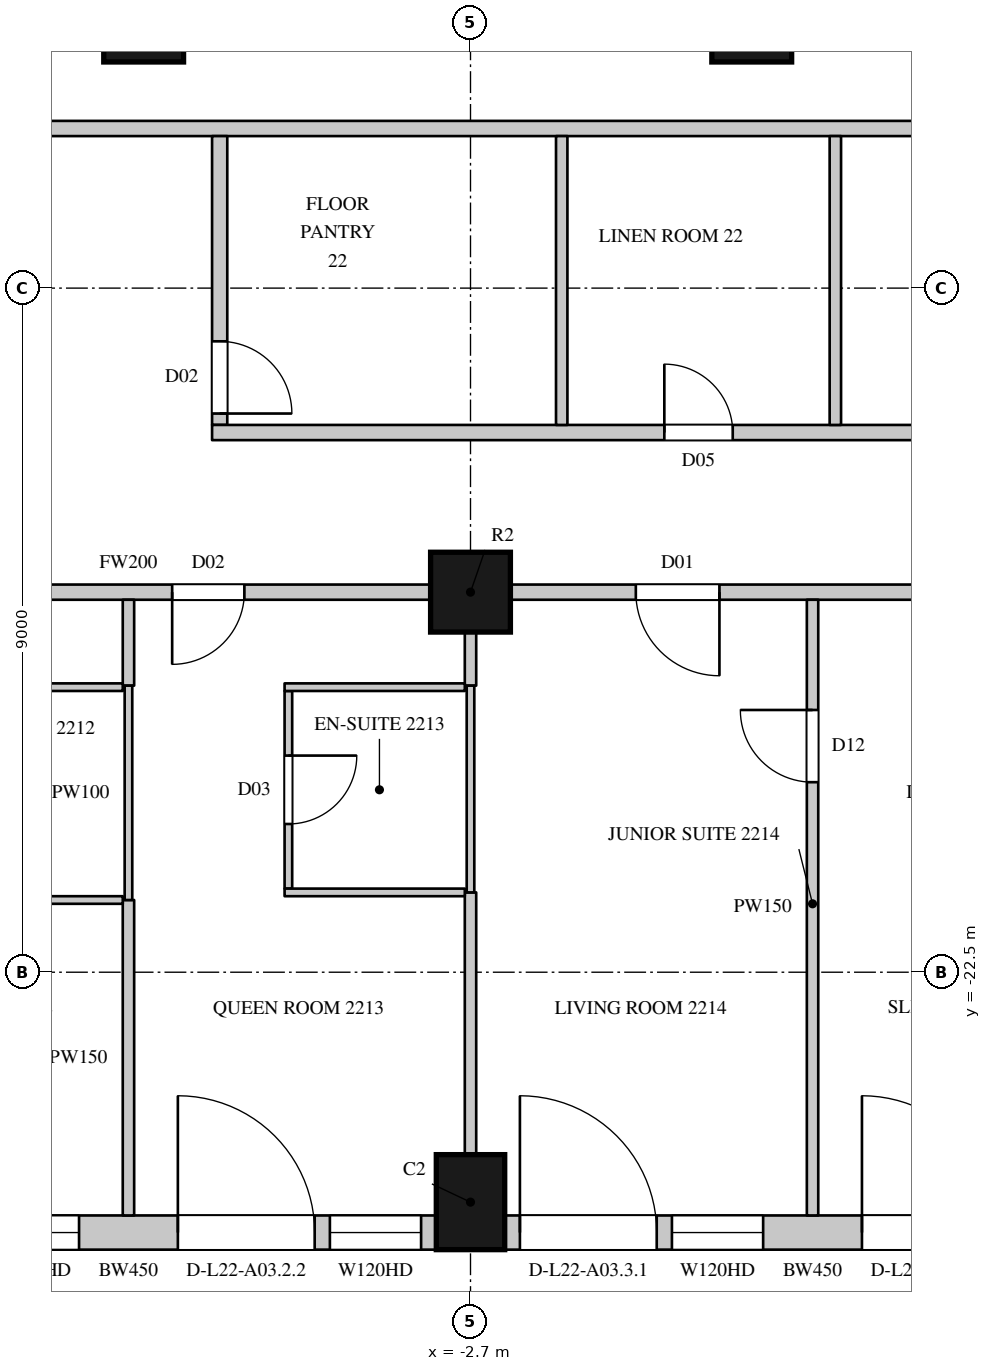
"""IFC4 building model, lengths in metres.
Left out: names, types, materials, properties, quantities, classifications, styles, units other than length and angle.
Written with IfcOpenShell. Run it as: python <this file> out.ifc"""

import sys

from ifc_helpers import new_model, si_unit, direction, frame, frame_2d, origin, origin_2d, place, context, subcontext, project, spatial, rectangle, circle, extrude, element, fill, save


model = new_model("IFC4")
c1 = context("Model", 3, precision=1e-05, world=origin(), true_north=direction((0.0, 1.0)))
c2 = subcontext(c1, "Body", "Model", "MODEL_VIEW")
j1 = project(units=[si_unit("LENGTHUNIT", "METRE"), si_unit("PLANEANGLEUNIT", "RADIAN")], contexts=[c1])
p1 = place(None, origin())
s1 = spatial("IfcSite", under=j1, at=p1, CompositionType="ELEMENT")
p2 = place(p1, origin())
s2 = spatial("IfcBuilding", under=s1, at=p2, CompositionType="ELEMENT")
p3 = place(p2, frame((0.0, 0.0, 109.5)))
s3 = spatial("IfcBuildingStorey", under=s2, at=p3, CompositionType="ELEMENT", Elevation=109.5)
p4 = place(p3, frame((-2.7, -25.525, 0.0), z_axis=(0.0, 0.0, 1.0), x_axis=(1.0, 0.0, 0.0)))
e1 = element("IfcColumn", 1, at=p4, inside=s3, PredefinedType="COLUMN", context=c2, shape_type="SweptSolid", body=[
    extrude(rectangle(XDim=0.9, YDim=1.25, at=origin_2d()), origin(), (0.0, 0.0, 1.0), 3.6),
])
for number, where, z_axis, x_axis in (
    (2, (-2.7, -17.5, 0.0), (0.0, 0.0, 1.0), (1.0, 0.0, 0.0)),
    (3, (-7.0, -10.0, 0.0), (0.0, 0.0, 1.0), (1.0, 0.0, 0.0)),
    (4, (1.0, -10.0, 0.0), (0.0, 0.0, 1.0), (1.0, 0.0, 0.0)),
):
    element("IfcColumn", number, at=place(p3, frame(where, z_axis=z_axis, x_axis=x_axis)), inside=s3, PredefinedType="COLUMN", context=c2, shape_type="SweptSolid", body=[
        extrude(circle(Radius=0.525, at=origin_2d()), origin(), (0.0, 0.0, 1.0), 3.6),
    ])
p5 = place(p3, frame((-11.25, -25.925, 0.0), z_axis=(0.0, 0.0, 1.0), x_axis=(1.0, 0.0, 0.0)))
e5 = element("IfcWall", 5, at=p5, inside=s3, PredefinedType="SOLIDWALL", context=c2, shape_type="SweptSolid", body=[
    extrude(rectangle(XDim=8.1, YDim=0.45, at=frame_2d((4.05, 0.0))), origin(), (0.0, 0.0, 1.0), 3.3),
])
p6 = place(p5, frame((0.2, 0.0, 0.0)))
e6 = element("IfcOpeningElement", 6, at=p6, cuts=e5, PredefinedType="OPENING", context=c2, shape_type="SweptSolid", body=[
    extrude(rectangle(XDim=1.8, YDim=2.4, at=frame_2d((0.9, 1.2))), frame((0.0, 0.235, 0.0), z_axis=(0.0, -1.0, 0.0), x_axis=(1.0, 0.0, 0.0)), (0.0, 0.0, 1.0), 0.47),
])
p7 = place(p5, frame((2.2, 0.0, 1.05)))
e7 = element("IfcOpeningElement", 7, at=p7, cuts=e5, PredefinedType="OPENING", context=c2, shape_type="SweptSolid", body=[
    extrude(rectangle(XDim=1.2, YDim=2.0, at=frame_2d((0.6, 1.0))), frame((0.0, 0.235, 0.0), z_axis=(0.0, -1.0, 0.0), x_axis=(1.0, 0.0, 0.0)), (0.0, 0.0, 1.0), 0.47),
])
p8 = place(p5, frame((4.7, 0.0, 0.0)))
e8 = element("IfcOpeningElement", 8, at=p8, cuts=e5, PredefinedType="OPENING", context=c2, shape_type="SweptSolid", body=[
    extrude(rectangle(XDim=1.8, YDim=2.4, at=frame_2d((0.9, 1.2))), frame((0.0, 0.235, 0.0), z_axis=(0.0, -1.0, 0.0), x_axis=(1.0, 0.0, 0.0)), (0.0, 0.0, 1.0), 0.47),
])
p9 = place(p5, frame((6.7, 0.0, 1.05)))
e9 = element("IfcOpeningElement", 9, at=p9, cuts=e5, PredefinedType="OPENING", context=c2, shape_type="SweptSolid", body=[
    extrude(rectangle(XDim=1.2, YDim=2.0, at=frame_2d((0.6, 1.0))), frame((0.0, 0.235, 0.0), z_axis=(0.0, -1.0, 0.0), x_axis=(1.0, 0.0, 0.0)), (0.0, 0.0, 1.0), 0.47),
])
p10 = place(p3, frame((-2.25, -25.925, 0.0), z_axis=(0.0, 0.0, 1.0), x_axis=(1.0, 0.0, 0.0)))
e10 = element("IfcWall", 10, at=p10, inside=s3, PredefinedType="SOLIDWALL", context=c2, shape_type="SweptSolid", body=[
    extrude(rectangle(XDim=8.1, YDim=0.45, at=frame_2d((4.05, 0.0))), origin(), (0.0, 0.0, 1.0), 3.3),
])
p11 = place(p10, frame((0.2, 0.0, 0.0)))
e11 = element("IfcOpeningElement", 11, at=p11, cuts=e10, PredefinedType="OPENING", context=c2, shape_type="SweptSolid", body=[
    extrude(rectangle(XDim=1.8, YDim=2.4, at=frame_2d((0.9, 1.2))), frame((0.0, 0.235, 0.0), z_axis=(0.0, -1.0, 0.0), x_axis=(1.0, 0.0, 0.0)), (0.0, 0.0, 1.0), 0.47),
])
p12 = place(p10, frame((2.2, 0.0, 1.05)))
e12 = element("IfcOpeningElement", 12, at=p12, cuts=e10, PredefinedType="OPENING", context=c2, shape_type="SweptSolid", body=[
    extrude(rectangle(XDim=1.2, YDim=2.0, at=frame_2d((0.6, 1.0))), frame((0.0, 0.235, 0.0), z_axis=(0.0, -1.0, 0.0), x_axis=(1.0, 0.0, 0.0)), (0.0, 0.0, 1.0), 0.47),
])
p13 = place(p10, frame((4.7, 0.0, 0.0)))
e13 = element("IfcOpeningElement", 13, at=p13, cuts=e10, PredefinedType="OPENING", context=c2, shape_type="SweptSolid", body=[
    extrude(rectangle(XDim=1.8, YDim=2.4, at=frame_2d((0.9, 1.2))), frame((0.0, 0.235, 0.0), z_axis=(0.0, -1.0, 0.0), x_axis=(1.0, 0.0, 0.0)), (0.0, 0.0, 1.0), 0.47),
])
p14 = place(p10, frame((6.7, 0.0, 1.05)))
e14 = element("IfcOpeningElement", 14, at=p14, cuts=e10, PredefinedType="OPENING", context=c2, shape_type="SweptSolid", body=[
    extrude(rectangle(XDim=1.2, YDim=2.0, at=frame_2d((0.6, 1.0))), frame((0.0, 0.235, 0.0), z_axis=(0.0, -1.0, 0.0), x_axis=(1.0, 0.0, 0.0)), (0.0, 0.0, 1.0), 0.47),
])
p15 = place(p3, frame((-11.175, -17.5, 0.0), z_axis=(0.0, 0.0, 1.0), x_axis=(1.0, 0.0, 0.0)))
e15 = element("IfcWall", 15, at=p15, inside=s3, PredefinedType="PARTITIONING", context=c2, shape_type="SweptSolid", body=[
    extrude(rectangle(XDim=7.95, YDim=0.2, at=frame_2d((3.975, 0.0))), origin(), (0.0, 0.0, 1.0), 2.75),
])
p16 = place(p15, frame((4.55, 0.0, 0.0)))
e16 = element("IfcOpeningElement", 16, at=p16, cuts=e15, PredefinedType="OPENING", context=c2, shape_type="SweptSolid", body=[
    extrude(rectangle(XDim=0.95, YDim=2.2, at=frame_2d((0.475, 1.1))), frame((0.0, 0.11, 0.0), z_axis=(0.0, -1.0, 0.0), x_axis=(1.0, 0.0, 0.0)), (0.0, 0.0, 1.0), 0.22),
])
p17 = place(p3, frame((-2.175, -17.5, 0.0), z_axis=(0.0, 0.0, 1.0), x_axis=(1.0, 0.0, 0.0)))
e17 = element("IfcWall", 17, at=p17, inside=s3, PredefinedType="PARTITIONING", context=c2, shape_type="SweptSolid", body=[
    extrude(rectangle(XDim=7.95, YDim=0.2, at=frame_2d((3.975, 0.0))), origin(), (0.0, 0.0, 1.0), 2.75),
])
p18 = place(p17, frame((1.65, 0.0, 0.0)))
e18 = element("IfcOpeningElement", 18, at=p18, cuts=e17, PredefinedType="OPENING", context=c2, shape_type="SweptSolid", body=[
    extrude(rectangle(XDim=1.1, YDim=2.4, at=frame_2d((0.55, 1.2))), frame((0.0, 0.11, 0.0), z_axis=(0.0, -1.0, 0.0), x_axis=(1.0, 0.0, 0.0)), (0.0, 0.0, 1.0), 0.22),
])
p19 = place(p3, frame((-8.5, -11.4, 0.0), z_axis=(0.0, 0.0, 1.0), x_axis=(1.0, 0.0, 0.0)))
e19 = element("IfcWall", 19, at=p19, inside=s3, PredefinedType="PARTITIONING", context=c2, shape_type="SweptSolid", body=[
    extrude(rectangle(XDim=18.9, YDim=0.2, at=frame_2d((9.45, 0.0))), origin(), (0.0, 0.0, 1.0), 3.3),
])
p20 = place(p3, frame((-6.0, -15.3, 0.0), z_axis=(0.0, 0.0, 1.0), x_axis=(0.0, 1.0, 0.0)))
e20 = element("IfcWall", 20, at=p20, inside=s3, PredefinedType="PARTITIONING", context=c2, shape_type="SweptSolid", body=[
    extrude(rectangle(XDim=3.8, YDim=0.2, at=frame_2d((1.9, 0.0))), origin(), (0.0, 0.0, 1.0), 3.3),
])
p21 = place(p20, frame((0.15, 0.0, 0.0)))
e21 = element("IfcOpeningElement", 21, at=p21, cuts=e20, PredefinedType="OPENING", context=c2, shape_type="SweptSolid", body=[
    extrude(rectangle(XDim=0.95, YDim=2.2, at=frame_2d((0.475, 1.1))), frame((0.0, 0.11, 0.0), z_axis=(0.0, -1.0, 0.0), x_axis=(1.0, 0.0, 0.0)), (0.0, 0.0, 1.0), 0.22),
])
p22 = place(p3, frame((-6.1, -15.4, 0.0), z_axis=(0.0, 0.0, 1.0), x_axis=(1.0, 0.0, 0.0)))
e22 = element("IfcWall", 22, at=p22, inside=s3, PredefinedType="PARTITIONING", context=c2, shape_type="SweptSolid", body=[
    extrude(rectangle(XDim=20.2, YDim=0.2, at=frame_2d((10.1, 0.0))), origin(), (0.0, 0.0, 1.0), 3.3),
])
p23 = place(p22, frame((5.95, 0.0, 0.0)))
e23 = element("IfcOpeningElement", 23, at=p23, cuts=e22, PredefinedType="OPENING", context=c2, shape_type="SweptSolid", body=[
    extrude(rectangle(XDim=0.9, YDim=2.2, at=frame_2d((0.45, 1.1))), frame((0.0, 0.11, 0.0), z_axis=(0.0, -1.0, 0.0), x_axis=(1.0, 0.0, 0.0)), (0.0, 0.0, 1.0), 0.22),
])
p24 = place(p22, frame((16.1, 0.0, 0.0)))
e24 = element("IfcOpeningElement", 24, at=p24, cuts=e22, PredefinedType="OPENING", context=c2, shape_type="SweptSolid", body=[
    extrude(rectangle(XDim=0.9, YDim=2.2, at=frame_2d((0.45, 1.1))), frame((0.0, 0.11, 0.0), z_axis=(0.0, -1.0, 0.0), x_axis=(1.0, 0.0, 0.0)), (0.0, 0.0, 1.0), 0.22),
])
p25 = place(p3, frame((-7.2, -25.7, 0.0), z_axis=(0.0, 0.0, 1.0), x_axis=(0.0, 1.0, 0.0)))
e25 = element("IfcWall", 25, at=p25, inside=s3, PredefinedType="PARTITIONING", context=c2, shape_type="SweptSolid", body=[
    extrude(rectangle(XDim=4.15, YDim=0.15, at=frame_2d((2.075, 0.0))), origin(), (0.0, 0.0, 1.0), 2.65),
])
p26 = place(p3, frame((-7.2, -18.73, 0.0), z_axis=(0.0, 0.0, 1.0), x_axis=(0.0, 1.0, 0.0)))
e26 = element("IfcWall", 26, at=p26, inside=s3, PredefinedType="PARTITIONING", context=c2, shape_type="SweptSolid", body=[
    extrude(rectangle(XDim=1.13, YDim=0.15, at=frame_2d((0.565, 0.0))), origin(), (0.0, 0.0, 1.0), 2.65),
])
p27 = place(p3, frame((-2.7, -24.9, 0.0), z_axis=(0.0, 0.0, 1.0), x_axis=(0.0, 1.0, 0.0)))
e27 = element("IfcWall", 27, at=p27, inside=s3, PredefinedType="PARTITIONING", context=c2, shape_type="SweptSolid", body=[
    extrude(rectangle(XDim=3.45, YDim=0.15, at=frame_2d((1.725, 0.0))), origin(), (0.0, 0.0, 1.0), 2.75),
])
p28 = place(p3, frame((-2.7, -18.73, 0.0), z_axis=(0.0, 0.0, 1.0), x_axis=(0.0, 1.0, 0.0)))
e28 = element("IfcWall", 28, at=p28, inside=s3, PredefinedType="PARTITIONING", context=c2, shape_type="SweptSolid", body=[
    extrude(rectangle(XDim=0.705, YDim=0.15, at=frame_2d((0.353, 0.0))), origin(), (0.0, 0.0, 1.0), 2.75),
])
p29 = place(p3, frame((-1.5, -15.3, 0.0), z_axis=(0.0, 0.0, 1.0), x_axis=(0.0, 1.0, 0.0)))
e29 = element("IfcWall", 29, at=p29, inside=s3, PredefinedType="PARTITIONING", context=c2, shape_type="SweptSolid", body=[
    extrude(rectangle(XDim=3.8, YDim=0.15, at=frame_2d((1.9, 0.0))), origin(), (0.0, 0.0, 1.0), 3.3),
])
p30 = place(p3, frame((1.8, -25.7, 0.0), z_axis=(0.0, 0.0, 1.0), x_axis=(0.0, 1.0, 0.0)))
e30 = element("IfcWall", 30, at=p30, inside=s3, PredefinedType="PARTITIONING", context=c2, shape_type="SweptSolid", body=[
    extrude(rectangle(XDim=8.1, YDim=0.15, at=frame_2d((4.05, 0.0))), origin(), (0.0, 0.0, 1.0), 2.65),
])
p31 = place(p30, frame((5.7, 0.0, 0.0)))
e31 = element("IfcOpeningElement", 31, at=p31, cuts=e30, PredefinedType="OPENING", context=c2, shape_type="SweptSolid", body=[
    extrude(rectangle(XDim=0.95, YDim=2.2, at=frame_2d((0.475, 1.1))), frame((0.0, 0.085, 0.0), z_axis=(0.0, -1.0, 0.0), x_axis=(1.0, 0.0, 0.0)), (0.0, 0.0, 1.0), 0.17),
])
p32 = place(p3, frame((2.1, -15.3, 0.0), z_axis=(0.0, 0.0, 1.0), x_axis=(0.0, 1.0, 0.0)))
e32 = element("IfcWall", 32, at=p32, inside=s3, PredefinedType="PARTITIONING", context=c2, shape_type="SweptSolid", body=[
    extrude(rectangle(XDim=3.8, YDim=0.15, at=frame_2d((1.9, 0.0))), origin(), (0.0, 0.0, 1.0), 3.3),
])
for number, where, z_axis, x_axis in (
    (33, (-9.846, -21.55, 0.0), (0.0, 0.0, 1.0), (1.0, 0.0, 0.0)),
    (34, (-9.846, -18.75, 0.0), (0.0, 0.0, 1.0), (1.0, 0.0, 0.0)),
):
    element("IfcWall", number, at=place(p3, frame(where, z_axis=z_axis, x_axis=x_axis)), inside=s3, PredefinedType="PARTITIONING", context=c2, shape_type="SweptSolid", body=[
        extrude(rectangle(XDim=2.571, YDim=0.1, at=frame_2d((1.286, 0.0))), origin(), (0.0, 0.0, 1.0), 3.3),
    ])
p33 = place(p3, frame((-7.2, -21.55, 0.0), z_axis=(0.0, 0.0, 1.0), x_axis=(0.0, 1.0, 0.0)))
e35 = element("IfcWall", 35, at=p33, inside=s3, PredefinedType="PARTITIONING", context=c2, shape_type="SweptSolid", body=[
    extrude(rectangle(XDim=2.82, YDim=0.1, at=frame_2d((1.41, 0.0))), origin(), (0.0, 0.0, 1.0), 2.65),
])
p34 = place(p3, frame((-5.096, -21.4, 0.0), z_axis=(0.0, 0.0, 1.0), x_axis=(0.0, 1.0, 0.0)))
e36 = element("IfcWall", 36, at=p34, inside=s3, PredefinedType="PARTITIONING", context=c2, shape_type="SweptSolid", body=[
    extrude(rectangle(XDim=2.6, YDim=0.1, at=frame_2d((1.3, 0.0))), origin(), (0.0, 0.0, 1.0), 3.3),
])
p35 = place(p34, frame((0.85, 0.0, 0.0)))
e37 = element("IfcOpeningElement", 37, at=p35, cuts=e36, PredefinedType="OPENING", context=c2, shape_type="SweptSolid", body=[
    extrude(rectangle(XDim=0.9, YDim=2.2, at=frame_2d((0.45, 1.1))), frame((0.0, 0.06, 0.0), z_axis=(0.0, -1.0, 0.0), x_axis=(1.0, 0.0, 0.0)), (0.0, 0.0, 1.0), 0.12),
])
for number, where, z_axis, x_axis in (
    (38, (-5.146, -21.45, 0.0), (0.0, 0.0, 1.0), (1.0, 0.0, 0.0)),
    (39, (-5.146, -18.75, 0.0), (0.0, 0.0, 1.0), (1.0, 0.0, 0.0)),
):
    element("IfcWall", number, at=place(p3, frame(where, z_axis=z_axis, x_axis=x_axis)), inside=s3, PredefinedType="PARTITIONING", context=c2, shape_type="SweptSolid", body=[
        extrude(rectangle(XDim=2.371, YDim=0.1, at=frame_2d((1.186, 0.0))), origin(), (0.0, 0.0, 1.0), 3.3),
    ])
p36 = place(p3, frame((-2.7, -21.45, 0.0), z_axis=(0.0, 0.0, 1.0), x_axis=(0.0, 1.0, 0.0)))
e40 = element("IfcWall", 40, at=p36, inside=s3, PredefinedType="PARTITIONING", context=c2, shape_type="SweptSolid", body=[
    extrude(rectangle(XDim=2.72, YDim=0.1, at=frame_2d((1.36, 0.0))), origin(), (0.0, 0.0, 1.0), 2.75),
])
p37 = place(p7, origin())
e41 = element("IfcWindow", 41, at=p37, inside=s3, PartitioningType="SINGLE_PANEL", PredefinedType="WINDOW", context=c2, shape_type="SweptSolid", body=[
    extrude(rectangle(XDim=1.2, YDim=2.0, at=frame_2d((0.6, 1.0))), frame((0.0, 0.135, 0.0), z_axis=(0.0, -1.0, 0.0), x_axis=(1.0, 0.0, 0.0)), (0.0, 0.0, 1.0), 0.06),
])
fill(e7, e41)
p38 = place(p8, origin())
e42 = element("IfcDoor", 42, at=p38, inside=s3, OperationType="SLIDING_TO_LEFT", PredefinedType="DOOR", context=c2, shape_type="SweptSolid", body=[
    extrude(rectangle(XDim=1.8, YDim=2.4, at=frame_2d((0.9, 1.2))), frame((0.0, 0.13, 0.0), z_axis=(0.0, -1.0, 0.0), x_axis=(1.0, 0.0, 0.0)), (0.0, 0.0, 1.0), 0.05),
])
fill(e8, e42)
p39 = place(p9, origin())
e43 = element("IfcWindow", 43, at=p39, inside=s3, PartitioningType="SINGLE_PANEL", PredefinedType="WINDOW", context=c2, shape_type="SweptSolid", body=[
    extrude(rectangle(XDim=1.2, YDim=2.0, at=frame_2d((0.6, 1.0))), frame((0.0, 0.135, 0.0), z_axis=(0.0, -1.0, 0.0), x_axis=(1.0, 0.0, 0.0)), (0.0, 0.0, 1.0), 0.06),
])
fill(e9, e43)
p40 = place(p11, origin())
e44 = element("IfcDoor", 44, at=p40, inside=s3, OperationType="SLIDING_TO_LEFT", PredefinedType="DOOR", context=c2, shape_type="SweptSolid", body=[
    extrude(rectangle(XDim=1.8, YDim=2.4, at=frame_2d((0.9, 1.2))), frame((0.0, 0.13, 0.0), z_axis=(0.0, -1.0, 0.0), x_axis=(1.0, 0.0, 0.0)), (0.0, 0.0, 1.0), 0.05),
])
fill(e11, e44)
p41 = place(p12, origin())
e45 = element("IfcWindow", 45, at=p41, inside=s3, PartitioningType="SINGLE_PANEL", PredefinedType="WINDOW", context=c2, shape_type="SweptSolid", body=[
    extrude(rectangle(XDim=1.2, YDim=2.0, at=frame_2d((0.6, 1.0))), frame((0.0, 0.135, 0.0), z_axis=(0.0, -1.0, 0.0), x_axis=(1.0, 0.0, 0.0)), (0.0, 0.0, 1.0), 0.06),
])
fill(e12, e45)
p42 = place(p13, origin())
e46 = element("IfcDoor", 46, at=p42, inside=s3, OperationType="SLIDING_TO_LEFT", PredefinedType="DOOR", context=c2, shape_type="SweptSolid", body=[
    extrude(rectangle(XDim=1.8, YDim=2.4, at=frame_2d((0.9, 1.2))), frame((0.0, 0.13, 0.0), z_axis=(0.0, -1.0, 0.0), x_axis=(1.0, 0.0, 0.0)), (0.0, 0.0, 1.0), 0.05),
])
fill(e13, e46)
p43 = place(p21, origin())
e47 = element("IfcDoor", 47, at=p43, inside=s3, OperationType="SINGLE_SWING_RIGHT", PredefinedType="DOOR", context=c2, shape_type="SweptSolid", body=[
    extrude(rectangle(XDim=0.95, YDim=2.2, at=frame_2d((0.475, 1.1))), frame((0.0, 0.025, 0.0), z_axis=(0.0, -1.0, 0.0), x_axis=(1.0, 0.0, 0.0)), (0.0, 0.0, 1.0), 0.05),
])
fill(e21, e47)
p44 = place(p23, origin())
e48 = element("IfcDoor", 48, at=p44, inside=s3, OperationType="SINGLE_SWING_LEFT", PredefinedType="DOOR", context=c2, shape_type="SweptSolid", body=[
    extrude(rectangle(XDim=0.9, YDim=2.2, at=frame_2d((0.45, 1.1))), frame((0.0, 0.025, 0.0), z_axis=(0.0, -1.0, 0.0), x_axis=(1.0, 0.0, 0.0)), (0.0, 0.0, 1.0), 0.05),
])
fill(e23, e48)
p45 = place(p16, origin())
e49 = element("IfcDoor", 49, at=p45, inside=s3, OperationType="SINGLE_SWING_RIGHT", PredefinedType="DOOR", context=c2, shape_type="SweptSolid", body=[
    extrude(rectangle(XDim=0.95, YDim=2.2, at=frame_2d((0.475, 1.1))), frame((0.0, 0.025, 0.0), z_axis=(0.0, -1.0, 0.0), x_axis=(1.0, 0.0, 0.0)), (0.0, 0.0, 1.0), 0.05),
])
fill(e16, e49)
p46 = place(p35, origin())
e50 = element("IfcDoor", 50, at=p46, inside=s3, OperationType="SINGLE_SWING_LEFT", PredefinedType="DOOR", context=c2, shape_type="SweptSolid", body=[
    extrude(rectangle(XDim=0.9, YDim=2.2, at=frame_2d((0.45, 1.1))), frame((0.0, 0.025, 0.0), z_axis=(0.0, -1.0, 0.0), x_axis=(1.0, 0.0, 0.0)), (0.0, 0.0, 1.0), 0.05),
])
fill(e37, e50)
p47 = place(p18, origin())
e51 = element("IfcDoor", 51, at=p47, inside=s3, OperationType="SINGLE_SWING_LEFT", PredefinedType="DOOR", context=c2, shape_type="SweptSolid", body=[
    extrude(rectangle(XDim=1.1, YDim=2.4, at=frame_2d((0.55, 1.2))), frame((0.0, 0.025, 0.0), z_axis=(0.0, -1.0, 0.0), x_axis=(1.0, 0.0, 0.0)), (0.0, 0.0, 1.0), 0.05),
])
fill(e18, e51)
p48 = place(p31, origin())
e52 = element("IfcDoor", 52, at=p48, inside=s3, OperationType="SINGLE_SWING_RIGHT", PredefinedType="DOOR", context=c2, shape_type="SweptSolid", body=[
    extrude(rectangle(XDim=0.95, YDim=2.2, at=frame_2d((0.475, 1.1))), frame((0.0, 0.025, 0.0), z_axis=(0.0, -1.0, 0.0), x_axis=(1.0, 0.0, 0.0)), (0.0, 0.0, 1.0), 0.05),
])
fill(e31, e52)
save(model, sys.argv[1])
